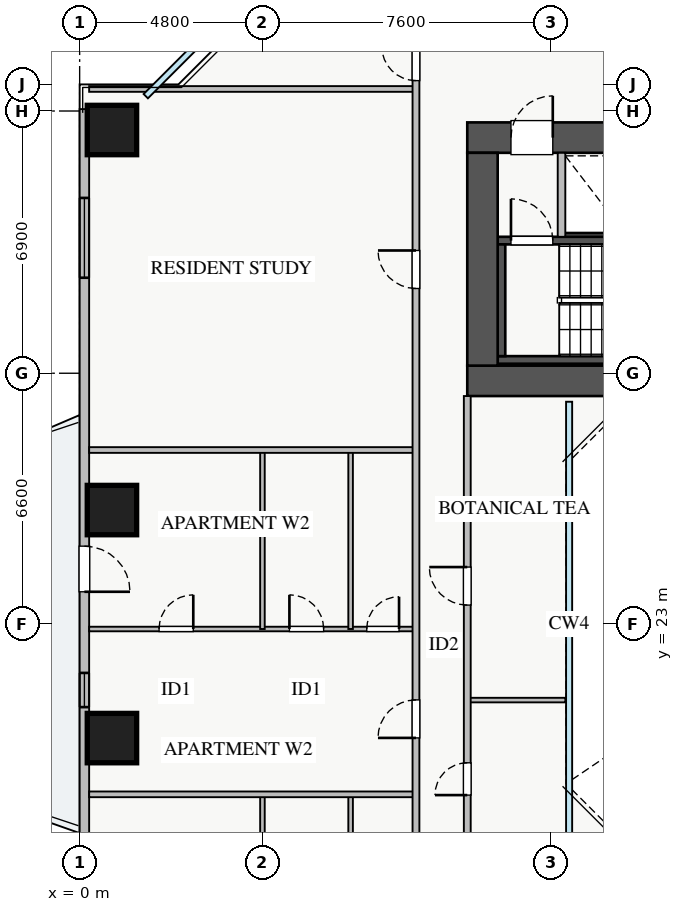
"""IFC4 building model, lengths in metres.
Left out: names, types, materials, properties, quantities, classifications, styles, units other than length and angle.
Written with IfcOpenShell. Run it as: python <this file> out.ifc"""

import sys

from ifc_helpers import new_model, si_unit, direction, frame, frame_2d, origin, origin_2d, place, context, subcontext, project, spatial, rectangle, extrude, source, transform, mapped, element, fill, save


model = new_model("IFC4")
c1 = context("Model", 3, precision=1e-05, world=origin(), true_north=direction((0.0, 1.0)))
c2 = subcontext(c1, "Body", "Model", "MODEL_VIEW")
j1 = project(units=[si_unit("LENGTHUNIT", "METRE"), si_unit("PLANEANGLEUNIT", "RADIAN")], contexts=[c1])
p1 = place(None, origin())
s1 = spatial("IfcSite", under=j1, at=p1, CompositionType="ELEMENT")
p2 = place(p1, origin())
s2 = spatial("IfcBuilding", under=s1, at=p2, CompositionType="ELEMENT")
p3 = place(p2, frame((0.0, 0.0, 36.0)))
s3 = spatial("IfcBuildingStorey", under=s2, at=p3, CompositionType="ELEMENT", Elevation=36.0)
p4 = place(p3, frame((12.68, 33.2, 0.0), z_axis=(0.0, 0.0, 1.0), x_axis=(1.0, 0.0, 0.0)))
e1 = element("IfcWall", 1, at=p4, inside=s3, PredefinedType="SHEAR", context=c2, shape_type="SweptSolid", body=[
    extrude(rectangle(XDim=1.94, YDim=0.18, at=frame_2d((0.97, 0.0))), origin(), (0.0, 0.0, 1.0), 3.07),
])
p5 = place(p3, frame((11.0, 29.95, 0.0), z_axis=(0.0, 0.0, 1.0), x_axis=(1.0, 0.0, 0.0)))
e2 = element("IfcWall", 2, at=p5, inside=s3, PredefinedType="SHEAR", context=c2, shape_type="SweptSolid", body=[
    extrude(rectangle(XDim=7.15, YDim=0.2, at=frame_2d((3.575, 0.0))), origin(), (0.0, 0.0, 1.0), 3.25),
])
p6 = place(p3, frame((11.0, 33.09, 0.0), z_axis=(0.0, 0.0, 1.0), x_axis=(1.0, 0.0, 0.0)))
e3 = element("IfcWall", 3, at=p6, inside=s3, PredefinedType="SHEAR", context=c2, shape_type="SweptSolid", body=[
    extrude(rectangle(XDim=7.15, YDim=0.2, at=frame_2d((3.575, 0.0))), origin(), (0.0, 0.0, 1.0), 3.25),
])
p7 = place(p6, frame((0.35, 0.0, 0.0)))
e4 = element("IfcOpeningElement", 4, at=p7, cuts=e3, PredefinedType="OPENING", context=c2, shape_type="SweptSolid", body=[
    extrude(rectangle(XDim=1.1, YDim=2.05, at=frame_2d((0.55, 1.025))), frame((0.0, 0.11, 0.0), z_axis=(0.0, -1.0, 0.0), x_axis=(1.0, 0.0, 0.0)), (0.0, 0.0, 1.0), 0.22),
])
p8 = place(p3, frame((11.1, 30.05, 0.0), z_axis=(0.0, 0.0, 1.0), x_axis=(0.0, 1.0, 0.0)))
e5 = element("IfcWall", 5, at=p8, inside=s3, PredefinedType="SHEAR", context=c2, shape_type="SweptSolid", body=[
    extrude(rectangle(XDim=2.94, YDim=0.2, at=frame_2d((1.47, 0.0))), origin(), (0.0, 0.0, 1.0), 3.25),
])
p9 = place(p3, frame((10.2, 29.4, 0.0), z_axis=(0.0, 0.0, 1.0), x_axis=(1.0, 0.0, 0.0)))
e6 = element("IfcWall", 6, at=p9, inside=s3, PredefinedType="SHEAR", context=c2, shape_type="SweptSolid", body=[
    extrude(rectangle(XDim=17.6, YDim=0.8, at=frame_2d((8.8, 0.0))), origin(), (0.0, 0.0, 1.0), 3.25),
])
p10 = place(p3, frame((10.2, 35.8, 0.0), z_axis=(0.0, 0.0, 1.0), x_axis=(1.0, 0.0, 0.0)))
e7 = element("IfcWall", 7, at=p10, inside=s3, PredefinedType="SHEAR", context=c2, shape_type="SweptSolid", body=[
    extrude(rectangle(XDim=17.6, YDim=0.8, at=frame_2d((8.8, 0.0))), origin(), (0.0, 0.0, 1.0), 3.25),
])
p11 = place(p10, frame((1.15, 0.0, 0.0)))
e8 = element("IfcOpeningElement", 8, at=p11, cuts=e7, PredefinedType="OPENING", context=c2, shape_type="SweptSolid", body=[
    extrude(rectangle(XDim=1.1, YDim=2.05, at=frame_2d((0.55, 1.025))), frame((0.0, 0.41, 0.0), z_axis=(0.0, -1.0, 0.0), x_axis=(1.0, 0.0, 0.0)), (0.0, 0.0, 1.0), 0.82),
])
p12 = place(p10, frame((8.3, 0.0, 0.0)))
e9 = element("IfcOpeningElement", 9, at=p12, cuts=e7, PredefinedType="OPENING", context=c2, shape_type="SweptSolid", body=[
    extrude(rectangle(XDim=1.1, YDim=2.05, at=frame_2d((0.55, 1.025))), frame((0.0, 0.41, 0.0), z_axis=(0.0, -1.0, 0.0), x_axis=(1.0, 0.0, 0.0)), (0.0, 0.0, 1.0), 0.82),
])
p13 = place(p10, frame((10.05, 0.0, 0.0)))
e10 = element("IfcOpeningElement", 10, at=p13, cuts=e7, PredefinedType="OPENING", context=c2, shape_type="SweptSolid", body=[
    extrude(rectangle(XDim=1.1, YDim=2.05, at=frame_2d((0.55, 1.025))), frame((0.0, 0.41, 0.0), z_axis=(0.0, -1.0, 0.0), x_axis=(1.0, 0.0, 0.0)), (0.0, 0.0, 1.0), 0.82),
])
p14 = place(p10, frame((14.74, 0.0, 0.0)))
e11 = element("IfcOpeningElement", 11, at=p14, cuts=e7, PredefinedType="OPENING", context=c2, shape_type="SweptSolid", body=[
    extrude(rectangle(XDim=1.0, YDim=2.05, at=frame_2d((0.5, 1.025))), frame((0.0, 0.41, 0.0), z_axis=(0.0, -1.0, 0.0), x_axis=(1.0, 0.0, 0.0)), (0.0, 0.0, 1.0), 0.82),
])
p15 = place(p10, frame((12.585, 0.0, 0.0)))
e12 = element("IfcOpeningElement", 12, at=p15, cuts=e7, PredefinedType="OPENING", context=c2, shape_type="SweptSolid", body=[
    extrude(rectangle(XDim=1.0, YDim=2.05, at=frame_2d((0.5, 1.025))), frame((0.0, 0.41, 0.0), z_axis=(0.0, -1.0, 0.0), x_axis=(1.0, 0.0, 0.0)), (0.0, 0.0, 1.0), 0.82),
])
p16 = place(p3, frame((10.6, 29.8, 0.0), z_axis=(0.0, 0.0, 1.0), x_axis=(0.0, 1.0, 0.0)))
e13 = element("IfcWall", 13, at=p16, inside=s3, PredefinedType="SHEAR", context=c2, shape_type="SweptSolid", body=[
    extrude(rectangle(XDim=5.6, YDim=0.8, at=frame_2d((2.8, 0.0))), origin(), (0.0, 0.0, 1.0), 3.25),
])
m1 = source(origin(), c2, "Body", "SweptSolid", [
    extrude(rectangle(XDim=1.3, YDim=1.3, at=origin_2d()), origin(), (0.0, 0.0, 1.0), 3.25),
])
for number, where, z_axis, x_axis in (
    (14, (0.85, 36.0, 0.0), (0.0, 0.0, 1.0), (1.0, 0.0, 0.0)),
    (15, (0.85, 26.0, 0.0), (0.0, 0.0, 1.0), (1.0, 0.0, 0.0)),
    (16, (0.85, 20.0, 0.0), (0.0, 0.0, 1.0), (1.0, 0.0, 0.0)),
):
    element("IfcColumn", number, at=place(p3, frame(where, z_axis=z_axis, x_axis=x_axis)), inside=s3, PredefinedType="COLUMN", context=c2, shape_type="MappedRepresentation", body=[
        mapped(m1, transform((0.0, 0.0, 0.0), x_axis=(1.0, 0.0, 0.0), y_axis=(0.0, 1.0, 0.0), z_axis=(0.0, 0.0, 1.0), scale=1.0)),
    ])
p17 = place(p3, frame((0.125, 9.45, 0.0), z_axis=(0.0, 0.0, 1.0), x_axis=(0.0, 1.0, 0.0)))
e17 = element("IfcWall", 17, at=p17, inside=s3, PredefinedType="STANDARD", context=c2, shape_type="SweptSolid", body=[
    extrude(rectangle(XDim=27.1, YDim=0.25, at=frame_2d((13.55, 0.0))), origin(), (0.0, 0.0, 1.0), 2.61),
])
p18 = place(p17, frame((14.4, 0.0, 0.0)))
e18 = element("IfcOpeningElement", 18, at=p18, cuts=e17, PredefinedType="OPENING", context=c2, shape_type="SweptSolid", body=[
    extrude(rectangle(XDim=1.2, YDim=2.1, at=frame_2d((0.6, 1.05))), frame((0.0, 0.135, 0.0), z_axis=(0.0, -1.0, 0.0), x_axis=(1.0, 0.0, 0.0)), (0.0, 0.0, 1.0), 0.27),
])
p19 = place(p17, frame((1.472, 0.0, 0.9)))
e19 = element("IfcOpeningElement", 19, at=p19, cuts=e17, PredefinedType="OPENING", context=c2, shape_type="SweptSolid", body=[
    extrude(rectangle(XDim=2.1, YDim=1.5, at=frame_2d((1.05, 0.75))), frame((0.0, 0.135, 0.0), z_axis=(0.0, -1.0, 0.0), x_axis=(1.0, 0.0, 0.0)), (0.0, 0.0, 1.0), 0.27),
])
p20 = place(p17, frame((22.663, 0.0, 0.9)))
e20 = element("IfcOpeningElement", 20, at=p20, cuts=e17, PredefinedType="OPENING", context=c2, shape_type="SweptSolid", body=[
    extrude(rectangle(XDim=2.1, YDim=1.48, at=frame_2d((1.05, 0.74))), frame((0.0, 0.135, 0.0), z_axis=(0.0, -1.0, 0.0), x_axis=(1.0, 0.0, 0.0)), (0.0, 0.0, 1.0), 0.27),
])
p21 = place(p17, frame((5.278, 0.0, 0.9)))
e21 = element("IfcOpeningElement", 21, at=p21, cuts=e17, PredefinedType="OPENING", context=c2, shape_type="SweptSolid", body=[
    extrude(rectangle(XDim=2.4, YDim=1.5, at=frame_2d((1.2, 0.75))), frame((0.0, 0.135, 0.0), z_axis=(0.0, -1.0, 0.0), x_axis=(1.0, 0.0, 0.0)), (0.0, 0.0, 1.0), 0.27),
])
p22 = place(p17, frame((11.365, 0.0, 0.9)))
e22 = element("IfcOpeningElement", 22, at=p22, cuts=e17, PredefinedType="OPENING", context=c2, shape_type="SweptSolid", body=[
    extrude(rectangle(XDim=0.9, YDim=1.2, at=frame_2d((0.45, 0.6))), frame((0.0, 0.135, 0.0), z_axis=(0.0, -1.0, 0.0), x_axis=(1.0, 0.0, 0.0)), (0.0, 0.0, 1.0), 0.27),
])
p23 = place(p3, frame((12.68, 33.19, 0.0), z_axis=(0.0, 0.0, 1.0), x_axis=(0.0, 1.0, 0.0)))
e23 = element("IfcWall", 23, at=p23, inside=s3, PredefinedType="PARTITIONING", context=c2, shape_type="SweptSolid", body=[
    extrude(rectangle(XDim=2.21, YDim=0.2, at=frame_2d((1.105, 0.0))), origin(), (0.0, 0.0, 1.0), 3.07),
])
p24 = place(p3, frame((0.25, 37.08, 0.0), z_axis=(0.0, 0.0, 1.0), x_axis=(1.0, 0.0, 0.0)))
e24 = element("IfcWall", 24, at=p24, inside=s3, PredefinedType="PARTITIONING", context=c2, shape_type="SweptSolid", body=[
    extrude(rectangle(XDim=8.6, YDim=0.15, at=frame_2d((4.3, 0.0))), origin(), (0.0, 0.0, 1.0), 3.07),
])
for number, where, z_axis, x_axis in (
    (25, (4.81, 13.35, 0.0), (0.0, 0.0, 1.0), (0.0, 1.0, 0.0)),
    (26, (7.13, 13.35, 0.0), (0.0, 0.0, 1.0), (0.0, 1.0, 0.0)),
):
    element("IfcWall", number, at=place(p3, frame(where, z_axis=z_axis, x_axis=x_axis)), inside=s3, PredefinedType="PLUMBINGWALL", context=c2, shape_type="SweptSolid", body=[
        extrude(rectangle(XDim=5.17, YDim=0.12, at=frame_2d((2.585, 0.0))), origin(), (0.0, 0.0, 1.0), 3.07),
    ])
p25 = place(p3, frame((0.25, 22.87, 0.0), z_axis=(0.0, 0.0, 1.0), x_axis=(1.0, 0.0, 0.0)))
e27 = element("IfcWall", 27, at=p25, inside=s3, PredefinedType="PLUMBINGWALL", context=c2, shape_type="SweptSolid", body=[
    extrude(rectangle(XDim=8.6, YDim=0.12, at=frame_2d((4.3, 0.0))), origin(), (0.0, 0.0, 1.0), 3.07),
])
p26 = place(p25, frame((1.84, 0.0, 0.0)))
e28 = element("IfcOpeningElement", 28, at=p26, cuts=e27, PredefinedType="OPENING", context=c2, shape_type="SweptSolid", body=[
    extrude(rectangle(XDim=0.9, YDim=2.05, at=frame_2d((0.45, 1.025))), frame((0.0, 0.07, 0.0), z_axis=(0.0, -1.0, 0.0), x_axis=(1.0, 0.0, 0.0)), (0.0, 0.0, 1.0), 0.14),
])
p27 = place(p25, frame((5.27, 0.0, 0.0)))
e29 = element("IfcOpeningElement", 29, at=p27, cuts=e27, PredefinedType="OPENING", context=c2, shape_type="SweptSolid", body=[
    extrude(rectangle(XDim=0.9, YDim=2.05, at=frame_2d((0.45, 1.025))), frame((0.0, 0.07, 0.0), z_axis=(0.0, -1.0, 0.0), x_axis=(1.0, 0.0, 0.0)), (0.0, 0.0, 1.0), 0.14),
])
p28 = place(p25, frame((7.305, 0.0, 0.0)))
e30 = element("IfcOpeningElement", 30, at=p28, cuts=e27, PredefinedType="OPENING", context=c2, shape_type="SweptSolid", body=[
    extrude(rectangle(XDim=0.85, YDim=2.05, at=frame_2d((0.425, 1.025))), frame((0.0, 0.07, 0.0), z_axis=(0.0, -1.0, 0.0), x_axis=(1.0, 0.0, 0.0)), (0.0, 0.0, 1.0), 0.14),
])
for number, where, z_axis, x_axis in (
    (31, (4.81, 22.87, 0.0), (0.0, 0.0, 1.0), (0.0, 1.0, 0.0)),
    (32, (7.13, 22.87, 0.0), (0.0, 0.0, 1.0), (0.0, 1.0, 0.0)),
):
    element("IfcWall", number, at=place(p3, frame(where, z_axis=z_axis, x_axis=x_axis)), inside=s3, PredefinedType="PLUMBINGWALL", context=c2, shape_type="SweptSolid", body=[
        extrude(rectangle(XDim=4.71, YDim=0.12, at=frame_2d((2.355, 0.0))), origin(), (0.0, 0.0, 1.0), 3.07),
    ])
p29 = place(p3, frame((0.25, 18.52, 0.0), z_axis=(0.0, 0.0, 1.0), x_axis=(1.0, 0.0, 0.0)))
e33 = element("IfcWall", 33, at=p29, inside=s3, PredefinedType="PARTITIONING", context=c2, shape_type="SweptSolid", body=[
    extrude(rectangle(XDim=8.6, YDim=0.15, at=frame_2d((4.3, 0.0))), origin(), (0.0, 0.0, 1.0), 3.07),
])
p30 = place(p3, frame((0.25, 27.58, 0.0), z_axis=(0.0, 0.0, 1.0), x_axis=(1.0, 0.0, 0.0)))
e34 = element("IfcWall", 34, at=p30, inside=s3, PredefinedType="PARTITIONING", context=c2, shape_type="SweptSolid", body=[
    extrude(rectangle(XDim=8.6, YDim=0.15, at=frame_2d((4.3, 0.0))), origin(), (0.0, 0.0, 1.0), 2.715),
])
p31 = place(p3, frame((8.85, 7.21, 0.0), z_axis=(0.0, 0.0, 1.0), x_axis=(0.0, 1.0, 0.0)))
e35 = element("IfcWall", 35, at=p31, inside=s3, PredefinedType="PARTITIONING", context=c2, shape_type="SweptSolid", body=[
    extrude(rectangle(XDim=31.23, YDim=0.18, at=frame_2d((15.615, 0.0))), origin(), (0.0, 0.0, 1.0), 3.07),
])
p32 = place(p31, frame((30.09, 0.0, 0.0)))
e36 = element("IfcOpeningElement", 36, at=p32, cuts=e35, PredefinedType="OPENING", context=c2, shape_type="SweptSolid", body=[
    extrude(rectangle(XDim=0.9, YDim=2.05, at=frame_2d((0.45, 1.025))), frame((0.0, 0.1, 0.0), z_axis=(0.0, -1.0, 0.0), x_axis=(1.0, 0.0, 0.0)), (0.0, 0.0, 1.0), 0.2),
])
p33 = place(p31, frame((0.24, 0.0, 0.0)))
e37 = element("IfcOpeningElement", 37, at=p33, cuts=e35, PredefinedType="OPENING", context=c2, shape_type="SweptSolid", body=[
    extrude(rectangle(XDim=0.9, YDim=2.05, at=frame_2d((0.45, 1.025))), frame((0.0, 0.1, 0.0), z_axis=(0.0, -1.0, 0.0), x_axis=(1.0, 0.0, 0.0)), (0.0, 0.0, 1.0), 0.2),
])
p34 = place(p31, frame((3.06, 0.0, 0.0)))
e38 = element("IfcOpeningElement", 38, at=p34, cuts=e35, PredefinedType="OPENING", context=c2, shape_type="SweptSolid", body=[
    extrude(rectangle(XDim=1.0, YDim=2.05, at=frame_2d((0.5, 1.025))), frame((0.0, 0.1, 0.0), z_axis=(0.0, -1.0, 0.0), x_axis=(1.0, 0.0, 0.0)), (0.0, 0.0, 1.0), 0.2),
])
p35 = place(p31, frame((12.795, 0.0, 0.0)))
e39 = element("IfcOpeningElement", 39, at=p35, cuts=e35, PredefinedType="OPENING", context=c2, shape_type="SweptSolid", body=[
    extrude(rectangle(XDim=1.0, YDim=2.05, at=frame_2d((0.5, 1.025))), frame((0.0, 0.1, 0.0), z_axis=(0.0, -1.0, 0.0), x_axis=(1.0, 0.0, 0.0)), (0.0, 0.0, 1.0), 0.2),
])
p36 = place(p31, frame((24.62, 0.0, 0.0)))
e40 = element("IfcOpeningElement", 40, at=p36, cuts=e35, PredefinedType="OPENING", context=c2, shape_type="SweptSolid", body=[
    extrude(rectangle(XDim=1.0, YDim=2.05, at=frame_2d((0.5, 1.025))), frame((0.0, 0.1, 0.0), z_axis=(0.0, -1.0, 0.0), x_axis=(1.0, 0.0, 0.0)), (0.0, 0.0, 1.0), 0.2),
])
p37 = place(p3, frame((10.2, 21.0, 0.0), z_axis=(0.0, 0.0, 1.0), x_axis=(1.0, 0.0, 0.0)))
e41 = element("IfcWall", 41, at=p37, inside=s3, PredefinedType="PLUMBINGWALL", context=c2, shape_type="SweptSolid", body=[
    extrude(rectangle(XDim=2.58, YDim=0.12, at=frame_2d((1.29, 0.0))), origin(), (0.0, 0.0, 1.0), 3.07),
])
p38 = place(p3, frame((10.2, 17.0, 0.0), z_axis=(0.0, 0.0, 1.0), x_axis=(0.0, 1.0, 0.0)))
e42 = element("IfcWall", 42, at=p38, inside=s3, PredefinedType="PARTITIONING", context=c2, shape_type="SweptSolid", body=[
    extrude(rectangle(XDim=12.0, YDim=0.18, at=frame_2d((6.0, 0.0))), origin(), (0.0, 0.0, 1.0), 3.07),
])
p39 = place(p38, frame((1.5, 0.0, 0.0)))
e43 = element("IfcOpeningElement", 43, at=p39, cuts=e42, PredefinedType="OPENING", context=c2, shape_type="SweptSolid", body=[
    extrude(rectangle(XDim=0.85, YDim=2.05, at=frame_2d((0.425, 1.025))), frame((0.0, 0.1, 0.0), z_axis=(0.0, -1.0, 0.0), x_axis=(1.0, 0.0, 0.0)), (0.0, 0.0, 1.0), 0.2),
])
p40 = place(p38, frame((6.5, 0.0, 0.0)))
e44 = element("IfcOpeningElement", 44, at=p40, cuts=e42, PredefinedType="OPENING", context=c2, shape_type="SweptSolid", body=[
    extrude(rectangle(XDim=1.0, YDim=2.05, at=frame_2d((0.5, 1.025))), frame((0.0, 0.1, 0.0), z_axis=(0.0, -1.0, 0.0), x_axis=(1.0, 0.0, 0.0)), (0.0, 0.0, 1.0), 0.2),
])
m2 = source(origin(), c2, "Body", "SweptSolid", [
    extrude(rectangle(XDim=1.2, YDim=2.1, at=frame_2d((0.6, 1.05))), frame((0.0, 0.025, 0.0), z_axis=(0.0, -1.0, 0.0), x_axis=(1.0, 0.0, 0.0)), (0.0, 0.0, 1.0), 0.05),
])
p41 = place(p18, frame((1.2, 0.0, 0.0), z_axis=(0.0, 0.0, 1.0), x_axis=(-1.0, 0.0, 0.0)))
e45 = element("IfcDoor", 45, at=p41, inside=s3, OperationType="SINGLE_SWING_LEFT", PredefinedType="DOOR", context=c2, shape_type="MappedRepresentation", body=[
    mapped(m2, transform((0.0, 0.0, 0.0), x_axis=(1.0, 0.0, 0.0), y_axis=(0.0, 1.0, 0.0), z_axis=(0.0, 0.0, 1.0), scale=1.0)),
])
fill(e18, e45)
m3 = source(origin(), c2, "Body", "SweptSolid", [
    extrude(rectangle(XDim=2.1, YDim=1.48, at=frame_2d((1.05, 0.74))), frame((0.0, 0.03, 0.0), z_axis=(0.0, -1.0, 0.0), x_axis=(1.0, 0.0, 0.0)), (0.0, 0.0, 1.0), 0.06),
])
p42 = place(p20, origin())
e46 = element("IfcWindow", 46, at=p42, inside=s3, PartitioningType="TRIPLE_PANEL_VERTICAL", PredefinedType="WINDOW", context=c2, shape_type="MappedRepresentation", body=[
    mapped(m3, transform((0.0, 0.0, 0.0), x_axis=(1.0, 0.0, 0.0), y_axis=(0.0, 1.0, 0.0), z_axis=(0.0, 0.0, 1.0), scale=1.0)),
])
fill(e20, e46)
m4 = source(origin(), c2, "Body", "SweptSolid", [
    extrude(rectangle(XDim=1.1, YDim=2.05, at=frame_2d((0.55, 1.025))), frame((0.0, 0.025, 0.0), z_axis=(0.0, -1.0, 0.0), x_axis=(1.0, 0.0, 0.0)), (0.0, 0.0, 1.0), 0.05),
])
p43 = place(p11, origin())
e47 = element("IfcDoor", 47, at=p43, inside=s3, OperationType="SINGLE_SWING_RIGHT", PredefinedType="DOOR", context=c2, shape_type="MappedRepresentation", body=[
    mapped(m4, transform((0.0, 0.0, 0.0), x_axis=(1.0, 0.0, 0.0), y_axis=(0.0, 1.0, 0.0), z_axis=(0.0, 0.0, 1.0), scale=1.0)),
])
fill(e8, e47)
p44 = place(p7, origin())
e48 = element("IfcDoor", 48, at=p44, inside=s3, OperationType="SINGLE_SWING_LEFT", PredefinedType="DOOR", context=c2, shape_type="MappedRepresentation", body=[
    mapped(m4, transform((0.0, 0.0, 0.0), x_axis=(1.0, 0.0, 0.0), y_axis=(0.0, 1.0, 0.0), z_axis=(0.0, 0.0, 1.0), scale=1.0)),
])
fill(e4, e48)
m5 = source(origin(), c2, "Body", "SweptSolid", [
    extrude(rectangle(XDim=0.9, YDim=2.05, at=frame_2d((0.45, 1.025))), frame((0.0, 0.025, 0.0), z_axis=(0.0, -1.0, 0.0), x_axis=(1.0, 0.0, 0.0)), (0.0, 0.0, 1.0), 0.05),
])
p45 = place(p26, origin())
e49 = element("IfcDoor", 49, at=p45, inside=s3, OperationType="SINGLE_SWING_RIGHT", PredefinedType="DOOR", context=c2, shape_type="MappedRepresentation", body=[
    mapped(m5, transform((0.0, 0.0, 0.0), x_axis=(1.0, 0.0, 0.0), y_axis=(0.0, 1.0, 0.0), z_axis=(0.0, 0.0, 1.0), scale=1.0)),
])
fill(e28, e49)
p46 = place(p27, origin())
e50 = element("IfcDoor", 50, at=p46, inside=s3, OperationType="SINGLE_SWING_LEFT", PredefinedType="DOOR", context=c2, shape_type="MappedRepresentation", body=[
    mapped(m5, transform((0.0, 0.0, 0.0), x_axis=(1.0, 0.0, 0.0), y_axis=(0.0, 1.0, 0.0), z_axis=(0.0, 0.0, 1.0), scale=1.0)),
])
fill(e29, e50)
m6 = source(origin(), c2, "Body", "SweptSolid", [
    extrude(rectangle(XDim=0.85, YDim=2.05, at=frame_2d((0.425, 1.025))), frame((0.0, 0.025, 0.0), z_axis=(0.0, -1.0, 0.0), x_axis=(1.0, 0.0, 0.0)), (0.0, 0.0, 1.0), 0.05),
])
p47 = place(p28, origin())
e51 = element("IfcDoor", 51, at=p47, inside=s3, OperationType="SINGLE_SWING_RIGHT", PredefinedType="DOOR", context=c2, shape_type="MappedRepresentation", body=[
    mapped(m6, transform((0.0, 0.0, 0.0), x_axis=(1.0, 0.0, 0.0), y_axis=(0.0, 1.0, 0.0), z_axis=(0.0, 0.0, 1.0), scale=1.0)),
])
fill(e30, e51)
p48 = place(p32, origin())
e52 = element("IfcDoor", 52, at=p48, inside=s3, OperationType="SINGLE_SWING_RIGHT", PredefinedType="DOOR", context=c2, shape_type="MappedRepresentation", body=[
    mapped(m5, transform((0.0, 0.0, 0.0), x_axis=(1.0, 0.0, 0.0), y_axis=(0.0, 1.0, 0.0), z_axis=(0.0, 0.0, 1.0), scale=1.0)),
])
fill(e36, e52)
m7 = source(origin(), c2, "Body", "SweptSolid", [
    extrude(rectangle(XDim=1.0, YDim=2.05, at=frame_2d((0.5, 1.025))), frame((0.0, 0.025, 0.0), z_axis=(0.0, -1.0, 0.0), x_axis=(1.0, 0.0, 0.0)), (0.0, 0.0, 1.0), 0.05),
])
p49 = place(p35, origin())
e53 = element("IfcDoor", 53, at=p49, inside=s3, OperationType="SINGLE_SWING_LEFT", PredefinedType="DOOR", context=c2, shape_type="MappedRepresentation", body=[
    mapped(m7, transform((0.0, 0.0, 0.0), x_axis=(1.0, 0.0, 0.0), y_axis=(0.0, 1.0, 0.0), z_axis=(0.0, 0.0, 1.0), scale=1.0)),
])
fill(e39, e53)
p50 = place(p36, origin())
e54 = element("IfcDoor", 54, at=p50, inside=s3, OperationType="SINGLE_SWING_RIGHT", PredefinedType="DOOR", context=c2, shape_type="MappedRepresentation", body=[
    mapped(m7, transform((0.0, 0.0, 0.0), x_axis=(1.0, 0.0, 0.0), y_axis=(0.0, 1.0, 0.0), z_axis=(0.0, 0.0, 1.0), scale=1.0)),
])
fill(e40, e54)
p51 = place(p39, origin())
e55 = element("IfcDoor", 55, at=p51, inside=s3, OperationType="SINGLE_SWING_LEFT", PredefinedType="DOOR", context=c2, shape_type="MappedRepresentation", body=[
    mapped(m6, transform((0.0, 0.0, 0.0), x_axis=(1.0, 0.0, 0.0), y_axis=(0.0, 1.0, 0.0), z_axis=(0.0, 0.0, 1.0), scale=1.0)),
])
fill(e43, e55)
p52 = place(p40, origin())
e56 = element("IfcDoor", 56, at=p52, inside=s3, OperationType="SINGLE_SWING_RIGHT", PredefinedType="DOOR", context=c2, shape_type="MappedRepresentation", body=[
    mapped(m7, transform((0.0, 0.0, 0.0), x_axis=(1.0, 0.0, 0.0), y_axis=(0.0, 1.0, 0.0), z_axis=(0.0, 0.0, 1.0), scale=1.0)),
])
fill(e44, e56)
m8 = source(origin(), c2, "Body", "SweptSolid", [
    extrude(rectangle(XDim=0.9, YDim=1.2, at=frame_2d((0.45, 0.6))), frame((0.0, 0.03, 0.0), z_axis=(0.0, -1.0, 0.0), x_axis=(1.0, 0.0, 0.0)), (0.0, 0.0, 1.0), 0.06),
])
p53 = place(p22, origin())
e57 = element("IfcWindow", 57, at=p53, inside=s3, PartitioningType="SINGLE_PANEL", PredefinedType="WINDOW", context=c2, shape_type="MappedRepresentation", body=[
    mapped(m8, transform((0.0, 0.0, 0.0), x_axis=(1.0, 0.0, 0.0), y_axis=(0.0, 1.0, 0.0), z_axis=(0.0, 0.0, 1.0), scale=1.0)),
])
fill(e22, e57)
save(model, sys.argv[1])
